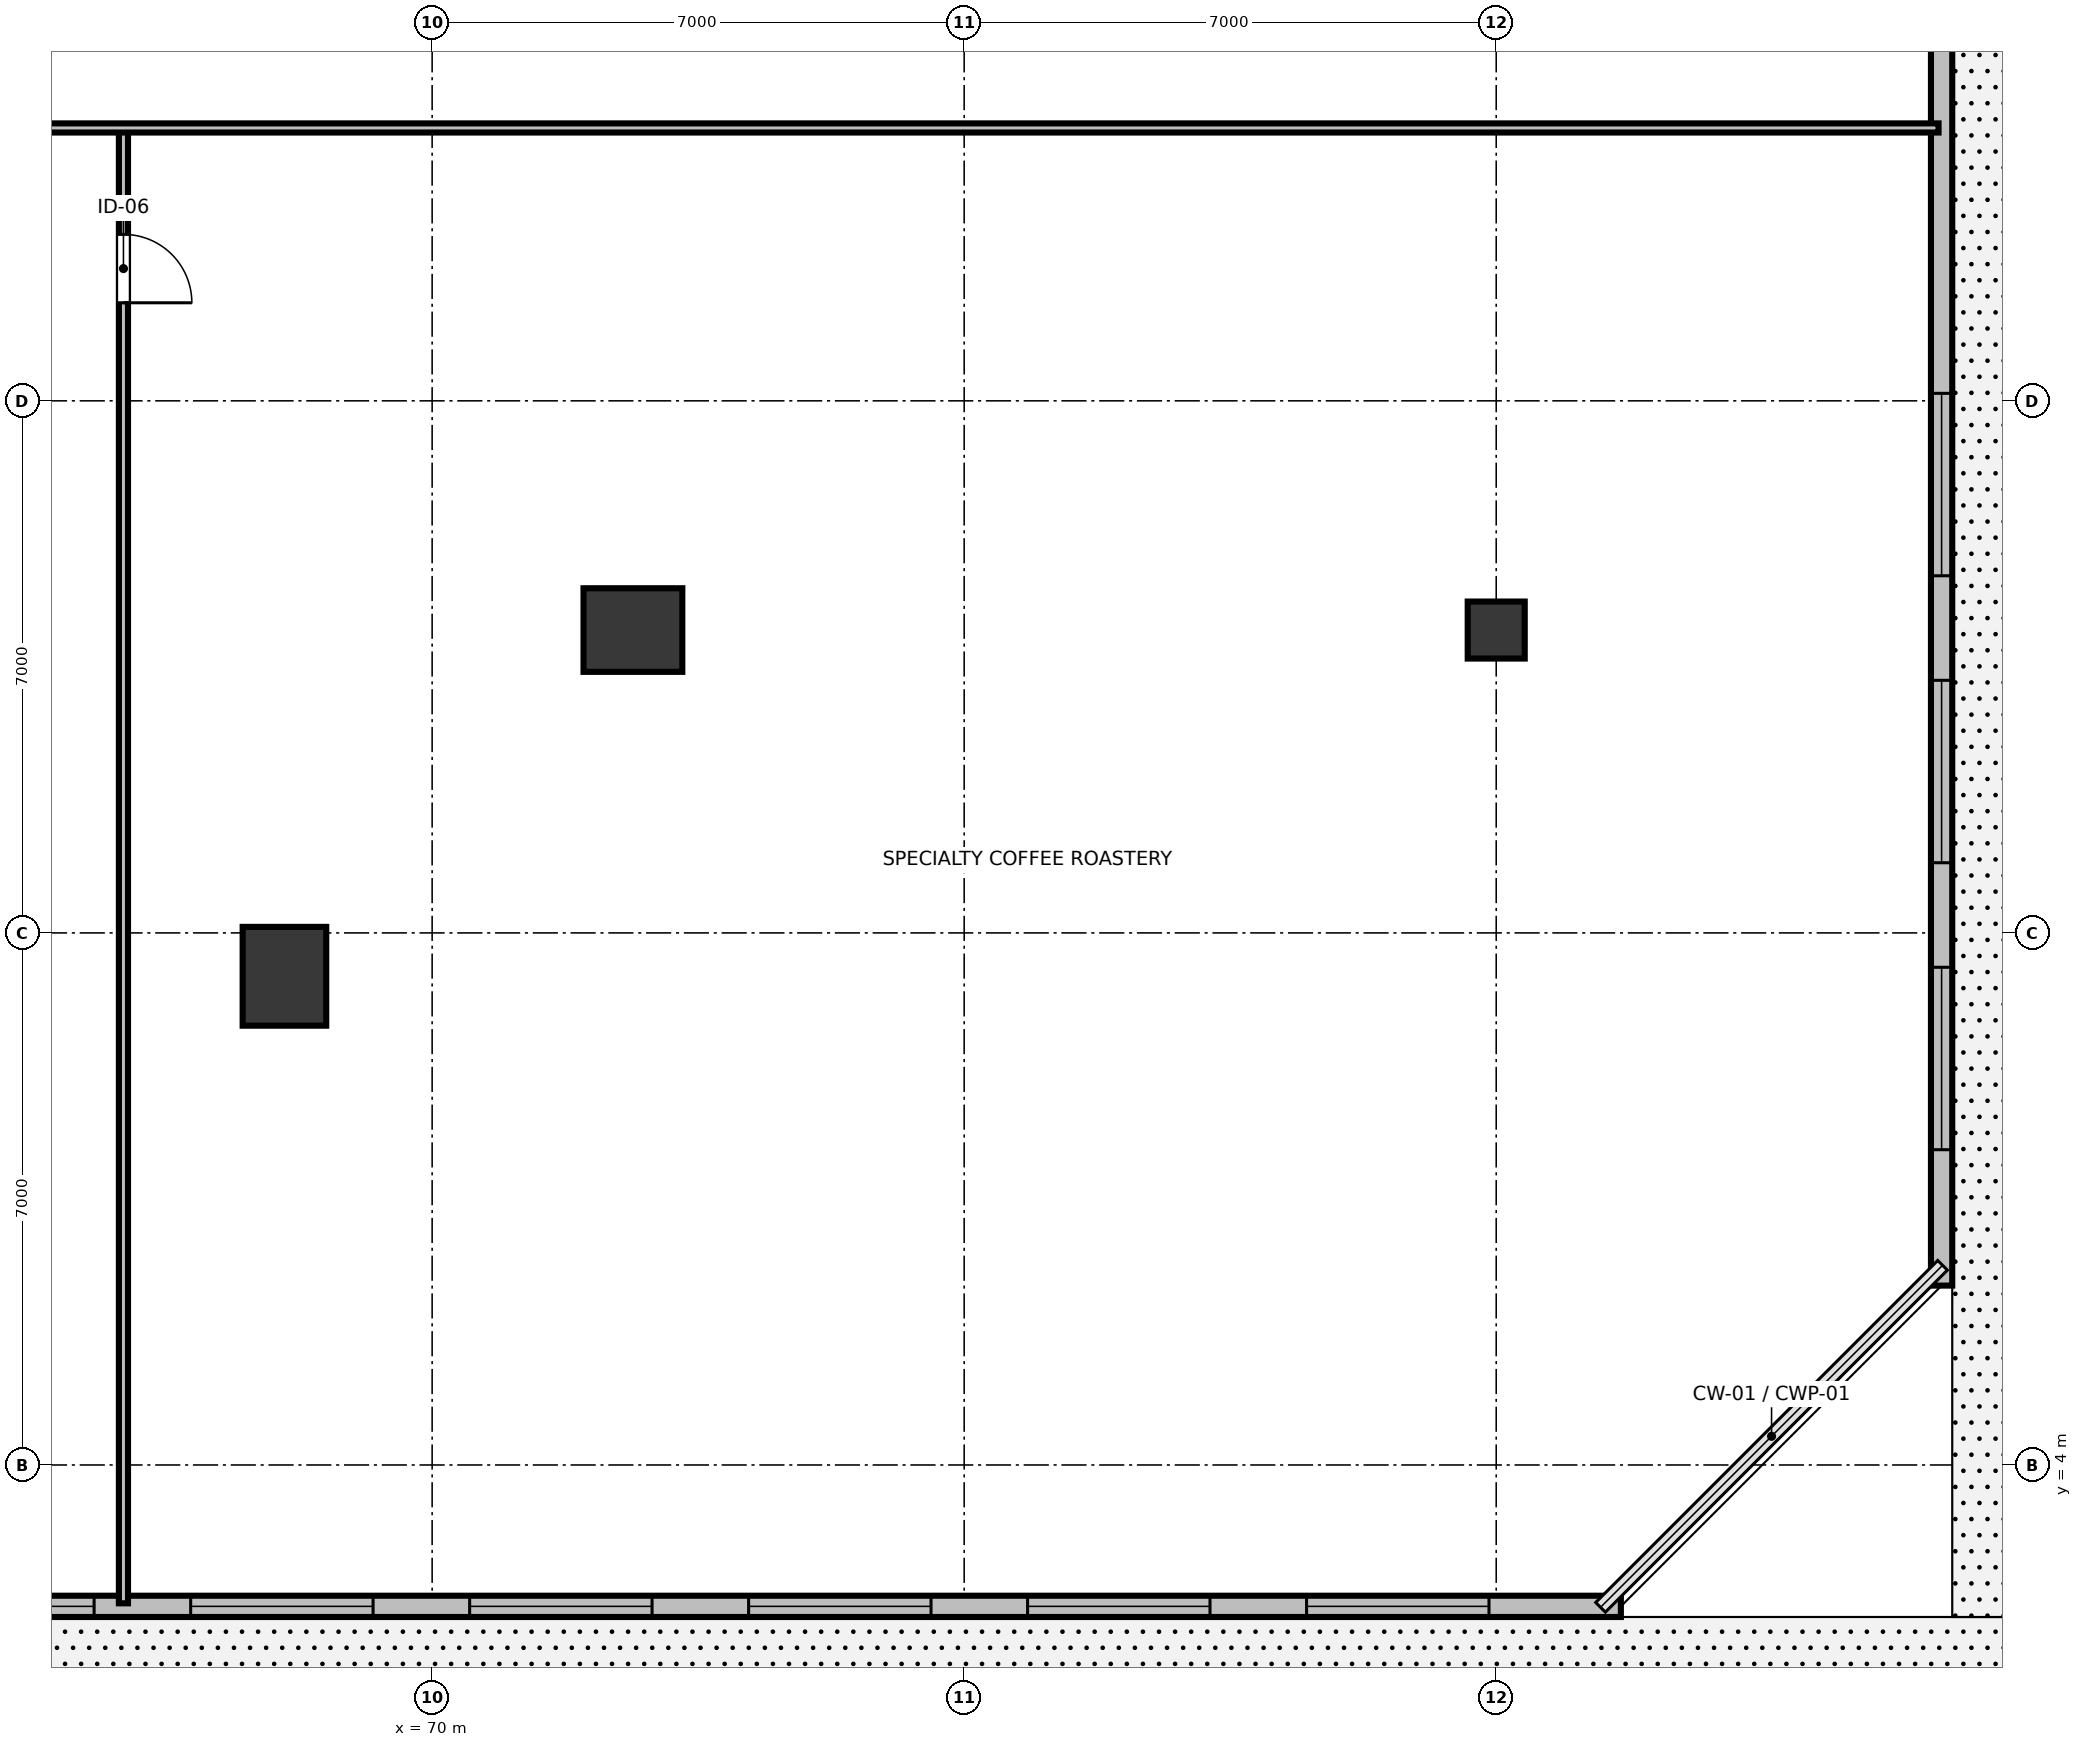
"""IFC4 building model, lengths in metres.
Left out: names, types, materials, properties, quantities, classifications, styles, units other than length and angle.
Written with IfcOpenShell. Run it as: python <this file> out.ifc"""

import sys

from ifc_helpers import new_model, si_unit, direction, frame, frame_2d, origin, origin_2d, place, context, subcontext, project, spatial, rectangle, hollow_rectangle, extrude, element, fill, save


model = new_model("IFC4")
c1 = context("Model", 3, precision=1e-05, world=origin(), true_north=direction((0.0, 1.0)))
c2 = subcontext(c1, "Body", "Model", "MODEL_VIEW")
j1 = project(units=[si_unit("LENGTHUNIT", "METRE"), si_unit("PLANEANGLEUNIT", "RADIAN")], contexts=[c1])
p1 = place(None, origin())
s1 = spatial("IfcSite", under=j1, at=p1, CompositionType="ELEMENT")
p2 = place(p1, origin())
s2 = spatial("IfcBuilding", under=s1, at=p2, CompositionType="ELEMENT")
p3 = place(p2, origin())
s3 = spatial("IfcBuildingStorey", under=s2, at=p3, CompositionType="ELEMENT", Elevation=0.0)
for number, where, z_axis, x_axis in (
    (1, (68.057, 10.429, 0.0), (0.0, 0.0, 1.0), (1.0, 0.0, 0.0)),
    (2, (72.642, 14.984, 0.0), (0.0, 0.0, 1.0), (0.0, 1.0, 0.0)),
):
    element("IfcColumn", number, at=place(p3, frame(where, z_axis=z_axis, x_axis=x_axis)), inside=s3, PredefinedType="COLUMN", context=c2, shape_type="SweptSolid", body=[
        extrude(hollow_rectangle(XDim=1.1, YDim=1.3, WallThickness=0.07, at=origin_2d()), origin(), (0.0, 0.0, 1.0), 4.718),
    ])
p4 = place(p3, frame((6.36, 2.14, 0.0), z_axis=(0.0, 0.0, 1.0), x_axis=(1.0, 0.0, 0.0)))
e3 = element("IfcWall", 3, at=p4, inside=s3, PredefinedType="STANDARD", context=c2, shape_type="SweptSolid", body=[
    extrude(rectangle(XDim=79.28, YDim=0.28, at=frame_2d((39.64, 0.0))), origin(), (0.0, 0.0, 1.0), 4.72),
])
p5 = place(p4, frame((41.79, 0.0, 0.0)))
e4 = element("IfcOpeningElement", 4, at=p5, cuts=e3, PredefinedType="OPENING", context=c2, shape_type="SweptSolid", body=[
    extrude(rectangle(XDim=2.4, YDim=2.6, at=frame_2d((1.2, 1.3))), frame((0.0, 0.15, 0.0), z_axis=(0.0, -1.0, 0.0), x_axis=(1.0, 0.0, 0.0)), (0.0, 0.0, 1.0), 0.3),
])
p6 = place(p4, frame((1.735, 0.0, 0.85)))
e5 = element("IfcOpeningElement", 5, at=p6, cuts=e3, PredefinedType="OPENING", context=c2, shape_type="SweptSolid", body=[
    extrude(rectangle(XDim=2.4, YDim=2.4, at=frame_2d((1.2, 1.2))), frame((0.0, 0.15, 0.0), z_axis=(0.0, -1.0, 0.0), x_axis=(1.0, 0.0, 0.0)), (0.0, 0.0, 1.0), 0.3),
])
p7 = place(p4, frame((5.406, 0.0, 0.85)))
e6 = element("IfcOpeningElement", 6, at=p7, cuts=e3, PredefinedType="OPENING", context=c2, shape_type="SweptSolid", body=[
    extrude(rectangle(XDim=2.4, YDim=2.4, at=frame_2d((1.2, 1.2))), frame((0.0, 0.15, 0.0), z_axis=(0.0, -1.0, 0.0), x_axis=(1.0, 0.0, 0.0)), (0.0, 0.0, 1.0), 0.3),
])
p8 = place(p4, frame((9.076, 0.0, 0.85)))
e7 = element("IfcOpeningElement", 7, at=p8, cuts=e3, PredefinedType="OPENING", context=c2, shape_type="SweptSolid", body=[
    extrude(rectangle(XDim=2.4, YDim=2.4, at=frame_2d((1.2, 1.2))), frame((0.0, 0.15, 0.0), z_axis=(0.0, -1.0, 0.0), x_axis=(1.0, 0.0, 0.0)), (0.0, 0.0, 1.0), 0.3),
])
p9 = place(p4, frame((12.747, 0.0, 0.85)))
e8 = element("IfcOpeningElement", 8, at=p9, cuts=e3, PredefinedType="OPENING", context=c2, shape_type="SweptSolid", body=[
    extrude(rectangle(XDim=2.4, YDim=2.4, at=frame_2d((1.2, 1.2))), frame((0.0, 0.15, 0.0), z_axis=(0.0, -1.0, 0.0), x_axis=(1.0, 0.0, 0.0)), (0.0, 0.0, 1.0), 0.3),
])
p10 = place(p4, frame((16.417, 0.0, 0.85)))
e9 = element("IfcOpeningElement", 9, at=p10, cuts=e3, PredefinedType="OPENING", context=c2, shape_type="SweptSolid", body=[
    extrude(rectangle(XDim=2.4, YDim=2.4, at=frame_2d((1.2, 1.2))), frame((0.0, 0.15, 0.0), z_axis=(0.0, -1.0, 0.0), x_axis=(1.0, 0.0, 0.0)), (0.0, 0.0, 1.0), 0.3),
])
p11 = place(p4, frame((20.088, 0.0, 0.85)))
e10 = element("IfcOpeningElement", 10, at=p11, cuts=e3, PredefinedType="OPENING", context=c2, shape_type="SweptSolid", body=[
    extrude(rectangle(XDim=2.4, YDim=2.4, at=frame_2d((1.2, 1.2))), frame((0.0, 0.15, 0.0), z_axis=(0.0, -1.0, 0.0), x_axis=(1.0, 0.0, 0.0)), (0.0, 0.0, 1.0), 0.3),
])
p12 = place(p4, frame((23.758, 0.0, 0.85)))
e11 = element("IfcOpeningElement", 11, at=p12, cuts=e3, PredefinedType="OPENING", context=c2, shape_type="SweptSolid", body=[
    extrude(rectangle(XDim=2.4, YDim=2.4, at=frame_2d((1.2, 1.2))), frame((0.0, 0.15, 0.0), z_axis=(0.0, -1.0, 0.0), x_axis=(1.0, 0.0, 0.0)), (0.0, 0.0, 1.0), 0.3),
])
p13 = place(p4, frame((31.099, 0.0, 0.85)))
e12 = element("IfcOpeningElement", 12, at=p13, cuts=e3, PredefinedType="OPENING", context=c2, shape_type="SweptSolid", body=[
    extrude(rectangle(XDim=2.4, YDim=2.4, at=frame_2d((1.2, 1.2))), frame((0.0, 0.15, 0.0), z_axis=(0.0, -1.0, 0.0), x_axis=(1.0, 0.0, 0.0)), (0.0, 0.0, 1.0), 0.3),
])
p14 = place(p4, frame((34.77, 0.0, 0.85)))
e13 = element("IfcOpeningElement", 13, at=p14, cuts=e3, PredefinedType="OPENING", context=c2, shape_type="SweptSolid", body=[
    extrude(rectangle(XDim=2.4, YDim=2.4, at=frame_2d((1.2, 1.2))), frame((0.0, 0.15, 0.0), z_axis=(0.0, -1.0, 0.0), x_axis=(1.0, 0.0, 0.0)), (0.0, 0.0, 1.0), 0.3),
])
p15 = place(p4, frame((45.781, 0.0, 0.85)))
e14 = element("IfcOpeningElement", 14, at=p15, cuts=e3, PredefinedType="OPENING", context=c2, shape_type="SweptSolid", body=[
    extrude(rectangle(XDim=2.4, YDim=2.4, at=frame_2d((1.2, 1.2))), frame((0.0, 0.15, 0.0), z_axis=(0.0, -1.0, 0.0), x_axis=(1.0, 0.0, 0.0)), (0.0, 0.0, 1.0), 0.3),
])
p16 = place(p4, frame((53.122, 0.0, 0.85)))
e15 = element("IfcOpeningElement", 15, at=p16, cuts=e3, PredefinedType="OPENING", context=c2, shape_type="SweptSolid", body=[
    extrude(rectangle(XDim=2.4, YDim=2.4, at=frame_2d((1.2, 1.2))), frame((0.0, 0.15, 0.0), z_axis=(0.0, -1.0, 0.0), x_axis=(1.0, 0.0, 0.0)), (0.0, 0.0, 1.0), 0.3),
])
p17 = place(p4, frame((56.792, 0.0, 0.85)))
e16 = element("IfcOpeningElement", 16, at=p17, cuts=e3, PredefinedType="OPENING", context=c2, shape_type="SweptSolid", body=[
    extrude(rectangle(XDim=2.4, YDim=2.4, at=frame_2d((1.2, 1.2))), frame((0.0, 0.15, 0.0), z_axis=(0.0, -1.0, 0.0), x_axis=(1.0, 0.0, 0.0)), (0.0, 0.0, 1.0), 0.3),
])
p18 = place(p4, frame((60.463, 0.0, 0.85)))
e17 = element("IfcOpeningElement", 17, at=p18, cuts=e3, PredefinedType="OPENING", context=c2, shape_type="SweptSolid", body=[
    extrude(rectangle(XDim=2.4, YDim=2.4, at=frame_2d((1.2, 1.2))), frame((0.0, 0.15, 0.0), z_axis=(0.0, -1.0, 0.0), x_axis=(1.0, 0.0, 0.0)), (0.0, 0.0, 1.0), 0.3),
])
p19 = place(p4, frame((64.133, 0.0, 0.85)))
e18 = element("IfcOpeningElement", 18, at=p19, cuts=e3, PredefinedType="OPENING", context=c2, shape_type="SweptSolid", body=[
    extrude(rectangle(XDim=2.4, YDim=2.4, at=frame_2d((1.2, 1.2))), frame((0.0, 0.15, 0.0), z_axis=(0.0, -1.0, 0.0), x_axis=(1.0, 0.0, 0.0)), (0.0, 0.0, 1.0), 0.3),
])
p20 = place(p4, frame((67.804, 0.0, 0.85)))
e19 = element("IfcOpeningElement", 19, at=p20, cuts=e3, PredefinedType="OPENING", context=c2, shape_type="SweptSolid", body=[
    extrude(rectangle(XDim=2.4, YDim=2.4, at=frame_2d((1.2, 1.2))), frame((0.0, 0.15, 0.0), z_axis=(0.0, -1.0, 0.0), x_axis=(1.0, 0.0, 0.0)), (0.0, 0.0, 1.0), 0.3),
])
p21 = place(p4, frame((71.474, 0.0, 0.85)))
e20 = element("IfcOpeningElement", 20, at=p21, cuts=e3, PredefinedType="OPENING", context=c2, shape_type="SweptSolid", body=[
    extrude(rectangle(XDim=2.4, YDim=2.4, at=frame_2d((1.2, 1.2))), frame((0.0, 0.15, 0.0), z_axis=(0.0, -1.0, 0.0), x_axis=(1.0, 0.0, 0.0)), (0.0, 0.0, 1.0), 0.3),
])
p22 = place(p4, frame((75.145, 0.0, 0.85)))
e21 = element("IfcOpeningElement", 21, at=p22, cuts=e3, PredefinedType="OPENING", context=c2, shape_type="SweptSolid", body=[
    extrude(rectangle(XDim=2.4, YDim=2.4, at=frame_2d((1.2, 1.2))), frame((0.0, 0.15, 0.0), z_axis=(0.0, -1.0, 0.0), x_axis=(1.0, 0.0, 0.0)), (0.0, 0.0, 1.0), 0.3),
])
p23 = place(p3, frame((89.86, 6.36, 0.0), z_axis=(0.0, 0.0, 1.0), x_axis=(0.0, 1.0, 0.0)))
e22 = element("IfcWall", 22, at=p23, inside=s3, PredefinedType="STANDARD", context=c2, shape_type="SweptSolid", body=[
    extrude(rectangle(XDim=51.28, YDim=0.28, at=frame_2d((25.64, 0.0))), origin(), (0.0, 0.0, 1.0), 4.72),
])
p24 = place(p23, frame((19.49, 0.0, 0.0)))
e23 = element("IfcOpeningElement", 23, at=p24, cuts=e22, PredefinedType="OPENING", context=c2, shape_type="SweptSolid", body=[
    extrude(rectangle(XDim=1.8, YDim=2.4, at=frame_2d((0.9, 1.2))), frame((0.0, 0.15, 0.0), z_axis=(0.0, -1.0, 0.0), x_axis=(1.0, 0.0, 0.0)), (0.0, 0.0, 1.0), 0.3),
])
p25 = place(p23, frame((37.19, 0.0, 0.0)))
e24 = element("IfcOpeningElement", 24, at=p25, cuts=e22, PredefinedType="OPENING", context=c2, shape_type="SweptSolid", body=[
    extrude(rectangle(XDim=3.6, YDim=3.6, at=frame_2d((1.8, 1.8))), frame((0.0, 0.15, 0.0), z_axis=(0.0, -1.0, 0.0), x_axis=(1.0, 0.0, 0.0)), (0.0, 0.0, 1.0), 0.3),
])
p26 = place(p23, frame((1.788, 0.0, 0.85)))
e25 = element("IfcOpeningElement", 25, at=p26, cuts=e22, PredefinedType="OPENING", context=c2, shape_type="SweptSolid", body=[
    extrude(rectangle(XDim=2.4, YDim=2.4, at=frame_2d((1.2, 1.2))), frame((0.0, 0.15, 0.0), z_axis=(0.0, -1.0, 0.0), x_axis=(1.0, 0.0, 0.0)), (0.0, 0.0, 1.0), 0.3),
])
p27 = place(p23, frame((5.563, 0.0, 0.85)))
e26 = element("IfcOpeningElement", 26, at=p27, cuts=e22, PredefinedType="OPENING", context=c2, shape_type="SweptSolid", body=[
    extrude(rectangle(XDim=2.4, YDim=2.4, at=frame_2d((1.2, 1.2))), frame((0.0, 0.15, 0.0), z_axis=(0.0, -1.0, 0.0), x_axis=(1.0, 0.0, 0.0)), (0.0, 0.0, 1.0), 0.3),
])
p28 = place(p23, frame((9.338, 0.0, 0.85)))
e27 = element("IfcOpeningElement", 27, at=p28, cuts=e22, PredefinedType="OPENING", context=c2, shape_type="SweptSolid", body=[
    extrude(rectangle(XDim=2.4, YDim=2.4, at=frame_2d((1.2, 1.2))), frame((0.0, 0.15, 0.0), z_axis=(0.0, -1.0, 0.0), x_axis=(1.0, 0.0, 0.0)), (0.0, 0.0, 1.0), 0.3),
])
p29 = place(p23, frame((43.317, 0.0, 0.85)))
e28 = element("IfcOpeningElement", 28, at=p29, cuts=e22, PredefinedType="OPENING", context=c2, shape_type="SweptSolid", body=[
    extrude(rectangle(XDim=2.4, YDim=2.4, at=frame_2d((1.2, 1.2))), frame((0.0, 0.15, 0.0), z_axis=(0.0, -1.0, 0.0), x_axis=(1.0, 0.0, 0.0)), (0.0, 0.0, 1.0), 0.3),
])
p30 = place(p23, frame((47.092, 0.0, 0.85)))
e29 = element("IfcOpeningElement", 29, at=p30, cuts=e22, PredefinedType="OPENING", context=c2, shape_type="SweptSolid", body=[
    extrude(rectangle(XDim=2.4, YDim=2.4, at=frame_2d((1.2, 1.2))), frame((0.0, 0.15, 0.0), z_axis=(0.0, -1.0, 0.0), x_axis=(1.0, 0.0, 0.0)), (0.0, 0.0, 1.0), 0.3),
])
p31 = place(p3, frame((65.938, 21.59, 0.0), z_axis=(0.0, 0.0, 1.0), x_axis=(0.0, -1.0, 0.0)))
e30 = element("IfcWall", 30, at=p31, inside=s3, PredefinedType="PARTITIONING", context=c2, shape_type="SweptSolid", body=[
    extrude(rectangle(XDim=19.41, YDim=0.12, at=frame_2d((9.705, 0.0))), origin(), (0.0, 0.0, 1.0), 3.82),
])
p32 = place(p31, frame((1.4, 0.0, 0.0)))
e31 = element("IfcOpeningElement", 31, at=p32, cuts=e30, PredefinedType="OPENING", context=c2, shape_type="SweptSolid", body=[
    extrude(rectangle(XDim=0.9, YDim=2.15, at=frame_2d((0.45, 1.075))), frame((0.0, 0.07, 0.0), z_axis=(0.0, -1.0, 0.0), x_axis=(1.0, 0.0, 0.0)), (0.0, 0.0, 1.0), 0.14),
])
p33 = place(p3, frame((57.35, 21.59, 0.0), z_axis=(0.0, 0.0, 1.0), x_axis=(1.0, 0.0, 0.0)))
e32 = element("IfcWall", 32, at=p33, inside=s3, PredefinedType="PARTITIONING", context=c2, shape_type="SweptSolid", body=[
    extrude(rectangle(XDim=32.47, YDim=0.12, at=frame_2d((16.235, 0.0))), origin(), (0.0, 0.0, 1.0), 3.82),
])
p34 = place(p3, frame((84.0, 14.984, 0.0), z_axis=(0.0, 0.0, 1.0), x_axis=(1.0, 0.0, 0.0)))
e33 = element("IfcColumn", 33, at=p34, inside=s3, PredefinedType="PILASTER", context=c2, shape_type="SweptSolid", body=[
    extrude(rectangle(XDim=0.75, YDim=0.75, at=origin_2d()), origin(), (0.0, 0.0, 1.0), 4.72),
])
p35 = place(p17, origin())
e34 = element("IfcWindow", 34, at=p35, inside=s3, PartitioningType="SINGLE_PANEL", PredefinedType="WINDOW", context=c2, shape_type="SweptSolid", body=[
    extrude(rectangle(XDim=2.4, YDim=2.4, at=frame_2d((1.2, 1.2))), frame((0.0, 0.03, 0.0), z_axis=(0.0, -1.0, 0.0), x_axis=(1.0, 0.0, 0.0)), (0.0, 0.0, 1.0), 0.06),
])
fill(e16, e34)
p36 = place(p18, origin())
e35 = element("IfcWindow", 35, at=p36, inside=s3, PartitioningType="SINGLE_PANEL", PredefinedType="WINDOW", context=c2, shape_type="SweptSolid", body=[
    extrude(rectangle(XDim=2.4, YDim=2.4, at=frame_2d((1.2, 1.2))), frame((0.0, 0.03, 0.0), z_axis=(0.0, -1.0, 0.0), x_axis=(1.0, 0.0, 0.0)), (0.0, 0.0, 1.0), 0.06),
])
fill(e17, e35)
p37 = place(p19, origin())
e36 = element("IfcWindow", 36, at=p37, inside=s3, PartitioningType="SINGLE_PANEL", PredefinedType="WINDOW", context=c2, shape_type="SweptSolid", body=[
    extrude(rectangle(XDim=2.4, YDim=2.4, at=frame_2d((1.2, 1.2))), frame((0.0, 0.03, 0.0), z_axis=(0.0, -1.0, 0.0), x_axis=(1.0, 0.0, 0.0)), (0.0, 0.0, 1.0), 0.06),
])
fill(e18, e36)
p38 = place(p20, origin())
e37 = element("IfcWindow", 37, at=p38, inside=s3, PartitioningType="SINGLE_PANEL", PredefinedType="WINDOW", context=c2, shape_type="SweptSolid", body=[
    extrude(rectangle(XDim=2.4, YDim=2.4, at=frame_2d((1.2, 1.2))), frame((0.0, 0.03, 0.0), z_axis=(0.0, -1.0, 0.0), x_axis=(1.0, 0.0, 0.0)), (0.0, 0.0, 1.0), 0.06),
])
fill(e19, e37)
p39 = place(p21, origin())
e38 = element("IfcWindow", 38, at=p39, inside=s3, PartitioningType="SINGLE_PANEL", PredefinedType="WINDOW", context=c2, shape_type="SweptSolid", body=[
    extrude(rectangle(XDim=2.4, YDim=2.4, at=frame_2d((1.2, 1.2))), frame((0.0, 0.03, 0.0), z_axis=(0.0, -1.0, 0.0), x_axis=(1.0, 0.0, 0.0)), (0.0, 0.0, 1.0), 0.06),
])
fill(e20, e38)
p40 = place(p22, origin())
e39 = element("IfcWindow", 39, at=p40, inside=s3, PartitioningType="SINGLE_PANEL", PredefinedType="WINDOW", context=c2, shape_type="SweptSolid", body=[
    extrude(rectangle(XDim=2.4, YDim=2.4, at=frame_2d((1.2, 1.2))), frame((0.0, 0.03, 0.0), z_axis=(0.0, -1.0, 0.0), x_axis=(1.0, 0.0, 0.0)), (0.0, 0.0, 1.0), 0.06),
])
fill(e21, e39)
p41 = place(p26, origin())
e40 = element("IfcWindow", 40, at=p41, inside=s3, PartitioningType="SINGLE_PANEL", PredefinedType="WINDOW", context=c2, shape_type="SweptSolid", body=[
    extrude(rectangle(XDim=2.4, YDim=2.4, at=frame_2d((1.2, 1.2))), frame((0.0, 0.03, 0.0), z_axis=(0.0, -1.0, 0.0), x_axis=(1.0, 0.0, 0.0)), (0.0, 0.0, 1.0), 0.06),
])
fill(e25, e40)
p42 = place(p27, origin())
e41 = element("IfcWindow", 41, at=p42, inside=s3, PartitioningType="SINGLE_PANEL", PredefinedType="WINDOW", context=c2, shape_type="SweptSolid", body=[
    extrude(rectangle(XDim=2.4, YDim=2.4, at=frame_2d((1.2, 1.2))), frame((0.0, 0.03, 0.0), z_axis=(0.0, -1.0, 0.0), x_axis=(1.0, 0.0, 0.0)), (0.0, 0.0, 1.0), 0.06),
])
fill(e26, e41)
p43 = place(p28, origin())
e42 = element("IfcWindow", 42, at=p43, inside=s3, PartitioningType="SINGLE_PANEL", PredefinedType="WINDOW", context=c2, shape_type="SweptSolid", body=[
    extrude(rectangle(XDim=2.4, YDim=2.4, at=frame_2d((1.2, 1.2))), frame((0.0, 0.03, 0.0), z_axis=(0.0, -1.0, 0.0), x_axis=(1.0, 0.0, 0.0)), (0.0, 0.0, 1.0), 0.06),
])
fill(e27, e42)
p44 = place(p32, origin())
e43 = element("IfcDoor", 43, at=p44, inside=s3, OperationType="SINGLE_SWING_RIGHT", PredefinedType="DOOR", context=c2, shape_type="SweptSolid", body=[
    extrude(rectangle(XDim=0.9, YDim=2.15, at=frame_2d((0.45, 1.075))), frame((0.0, 0.025, 0.0), z_axis=(0.0, -1.0, 0.0), x_axis=(1.0, 0.0, 0.0)), (0.0, 0.0, 1.0), 0.05),
])
fill(e31, e43)
save(model, sys.argv[1])
